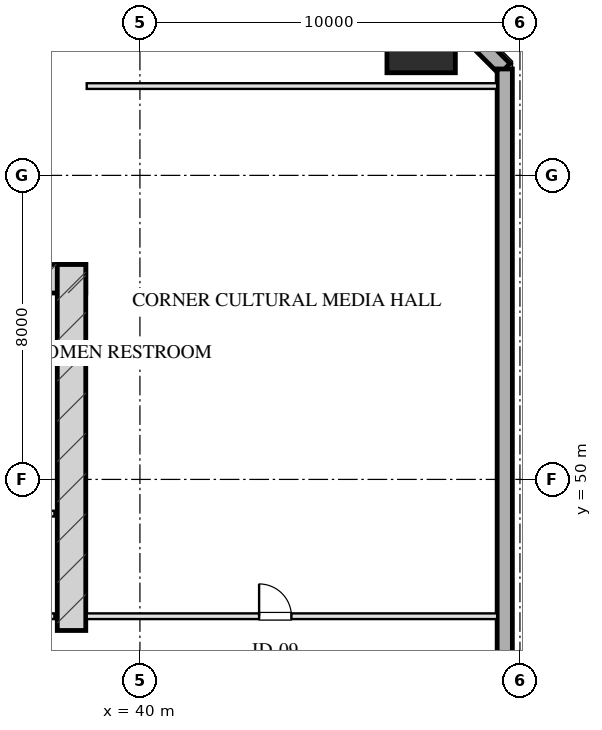
"""IFC4 building model, lengths in metres.
Left out: names, types, materials, properties, quantities, classifications, styles, units other than length and angle.
Written with IfcOpenShell. Run it as: python <this file> out.ifc"""

import sys

from ifc_helpers import new_model, si_unit, direction, frame, frame_2d, origin, origin_2d, place, context, subcontext, project, spatial, rectangle, hollow_rectangle, extrude, element, fill, save


model = new_model("IFC4")
c1 = context("Model", 3, precision=1e-05, world=origin(), true_north=direction((0.0, 1.0)))
c2 = subcontext(c1, "Body", "Model", "MODEL_VIEW")
j1 = project(units=[si_unit("LENGTHUNIT", "METRE"), si_unit("PLANEANGLEUNIT", "RADIAN")], contexts=[c1])
p1 = place(None, origin())
s1 = spatial("IfcSite", under=j1, at=p1, CompositionType="ELEMENT")
p2 = place(p1, origin())
s2 = spatial("IfcBuilding", under=s1, at=p2, CompositionType="ELEMENT")
p3 = place(p2, frame((0.0, 0.0, 78.2)))
s3 = spatial("IfcBuildingStorey", under=s2, at=p3, CompositionType="ELEMENT", Elevation=78.2)
p4 = place(p3, frame((21.425, 55.28, 0.0), z_axis=(0.0, 0.0, 1.0), x_axis=(1.0, 0.0, 0.0)))
e1 = element("IfcWall", 1, at=p4, inside=s3, PredefinedType="SHEAR", context=c2, shape_type="SweptSolid", body=[
    extrude(rectangle(XDim=17.15, YDim=0.75, at=frame_2d((8.575, 0.0))), origin(), (0.0, 0.0, 1.0), 3.45),
])
p5 = place(p3, frame((38.2, 46.025, 0.0), z_axis=(0.0, 0.0, 1.0), x_axis=(0.0, 1.0, 0.0)))
e2 = element("IfcWall", 2, at=p5, inside=s3, PredefinedType="SHEAR", context=c2, shape_type="SweptSolid", body=[
    extrude(rectangle(XDim=9.63, YDim=0.75, at=frame_2d((4.815, 0.0))), origin(), (0.0, 0.0, 1.0), 3.45),
])
p6 = place(p3, frame((47.4, 61.6, 0.0), z_axis=(0.0, 0.0, 1.0), x_axis=(1.0, 0.0, 0.0)))
e3 = element("IfcColumn", 3, at=p6, inside=s3, PredefinedType="COLUMN", context=c2, shape_type="SweptSolid", body=[
    extrude(hollow_rectangle(XDim=1.8, YDim=1.8, WallThickness=0.06, at=origin_2d()), origin(), (0.0, 0.0, 1.0), 3.451),
])
p7 = place(p3, frame((46.6, 63.8, 0.0), z_axis=(0.0, 0.0, 1.0), x_axis=(0.707106781187, -0.707106781187, 0.0)))
e4 = element("IfcWall", 4, at=p7, inside=s3, PredefinedType="SOLIDWALL", context=c2, shape_type="SweptSolid", body=[
    extrude(rectangle(XDim=4.243, YDim=0.4, at=frame_2d((2.121, 0.0))), origin(), (0.0, 0.0, 1.0), 2.61),
])
p8 = place(p3, frame((49.6, 60.8, 0.0), z_axis=(0.0, 0.0, 1.0), x_axis=(0.0, -1.0, 0.0)))
e5 = element("IfcWall", 5, at=p8, inside=s3, PredefinedType="SOLIDWALL", context=c2, shape_type="SweptSolid", body=[
    extrude(rectangle(XDim=53.6, YDim=0.4, at=frame_2d((26.8, 0.0))), origin(), (0.0, 0.0, 1.0), 2.61),
])
p9 = place(p8, frame((20.45, 0.0, 0.0)))
e6 = element("IfcOpeningElement", 6, at=p9, cuts=e5, PredefinedType="OPENING", context=c2, shape_type="SweptSolid", body=[
    extrude(rectangle(XDim=1.1, YDim=2.15, at=frame_2d((0.55, 1.075))), frame((0.0, 0.21, 0.0), z_axis=(0.0, -1.0, 0.0), x_axis=(1.0, 0.0, 0.0)), (0.0, 0.0, 1.0), 0.42),
])
p10 = place(p3, frame((33.95, 46.4, 0.0), z_axis=(0.0, 0.0, 1.0), x_axis=(1.0, 0.0, 0.0)))
e7 = element("IfcWall", 7, at=p10, inside=s3, PredefinedType="PARTITIONING", context=c2, shape_type="SweptSolid", body=[
    extrude(rectangle(XDim=3.8, YDim=0.15, at=frame_2d((1.9, 0.0))), origin(), (0.0, 0.0, 1.0), 3.175),
])
p11 = place(p10, frame((0.45, 0.0, 0.0)))
e8 = element("IfcOpeningElement", 8, at=p11, cuts=e7, PredefinedType="OPENING", context=c2, shape_type="SweptSolid", body=[
    extrude(rectangle(XDim=0.95, YDim=2.05, at=frame_2d((0.475, 1.025))), frame((0.0, 0.085, 0.0), z_axis=(0.0, -1.0, 0.0), x_axis=(1.0, 0.0, 0.0)), (0.0, 0.0, 1.0), 0.17),
])
p12 = place(p3, frame((33.95, 49.1, 0.0), z_axis=(0.0, 0.0, 1.0), x_axis=(1.0, 0.0, 0.0)))
e9 = element("IfcWall", 9, at=p12, inside=s3, PredefinedType="PARTITIONING", context=c2, shape_type="SweptSolid", body=[
    extrude(rectangle(XDim=3.8, YDim=0.15, at=frame_2d((1.9, 0.0))), origin(), (0.0, 0.0, 1.0), 3.175),
])
p13 = place(p12, frame((0.35, 0.0, 0.0)))
e10 = element("IfcOpeningElement", 10, at=p13, cuts=e9, PredefinedType="OPENING", context=c2, shape_type="SweptSolid", body=[
    extrude(rectangle(XDim=0.9, YDim=2.05, at=frame_2d((0.45, 1.025))), frame((0.0, 0.085, 0.0), z_axis=(0.0, -1.0, 0.0), x_axis=(1.0, 0.0, 0.0)), (0.0, 0.0, 1.0), 0.17),
])
p14 = place(p12, frame((2.1, 0.0, 0.0)))
e11 = element("IfcOpeningElement", 11, at=p14, cuts=e9, PredefinedType="OPENING", context=c2, shape_type="SweptSolid", body=[
    extrude(rectangle(XDim=0.9, YDim=2.05, at=frame_2d((0.45, 1.025))), frame((0.0, 0.085, 0.0), z_axis=(0.0, -1.0, 0.0), x_axis=(1.0, 0.0, 0.0)), (0.0, 0.0, 1.0), 0.17),
])
p15 = place(p3, frame((38.6, 60.35, 0.0), z_axis=(0.0, 0.0, 1.0), x_axis=(1.0, 0.0, 0.0)))
e12 = element("IfcWall", 12, at=p15, inside=s3, PredefinedType="PARTITIONING", context=c2, shape_type="SweptSolid", body=[
    extrude(rectangle(XDim=10.8, YDim=0.15, at=frame_2d((5.4, 0.0))), origin(), (0.0, 0.0, 1.0), 3.175),
])
p16 = place(p3, frame((38.6, 46.4, 0.0), z_axis=(0.0, 0.0, 1.0), x_axis=(1.0, 0.0, 0.0)))
e13 = element("IfcWall", 13, at=p16, inside=s3, PredefinedType="PARTITIONING", context=c2, shape_type="SweptSolid", body=[
    extrude(rectangle(XDim=10.8, YDim=0.15, at=frame_2d((5.4, 0.0))), origin(), (0.0, 0.0, 1.0), 3.175),
])
p17 = place(p16, frame((4.536, 0.0, 0.0)))
e14 = element("IfcOpeningElement", 14, at=p17, cuts=e13, PredefinedType="OPENING", context=c2, shape_type="SweptSolid", body=[
    extrude(rectangle(XDim=0.85, YDim=2.05, at=frame_2d((0.425, 1.025))), frame((0.0, 0.085, 0.0), z_axis=(0.0, -1.0, 0.0), x_axis=(1.0, 0.0, 0.0)), (0.0, 0.0, 1.0), 0.17),
])
p18 = place(p17, origin())
e15 = element("IfcDoor", 15, at=p18, inside=s3, OperationType="SINGLE_SWING_LEFT", PredefinedType="DOOR", context=c2, shape_type="SweptSolid", body=[
    extrude(rectangle(XDim=0.85, YDim=2.05, at=frame_2d((0.425, 1.025))), frame((0.0, 0.025, 0.0), z_axis=(0.0, -1.0, 0.0), x_axis=(1.0, 0.0, 0.0)), (0.0, 0.0, 1.0), 0.05),
])
fill(e14, e15)
save(model, sys.argv[1])
